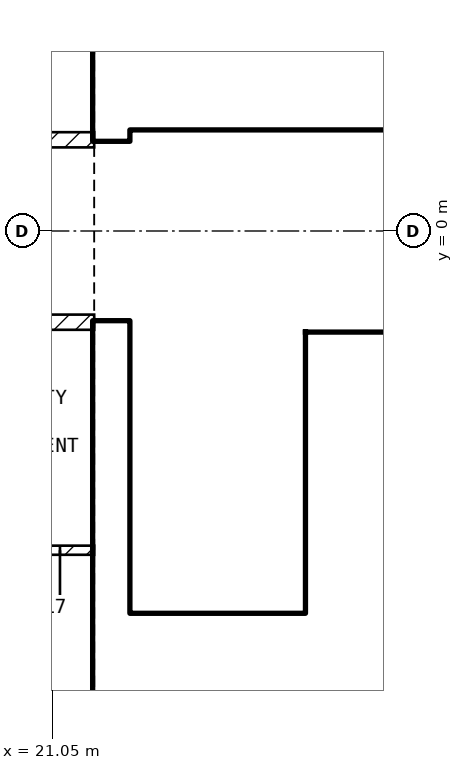
"""IFC4 building model, lengths in metres.
Left out: names, types, materials, properties, quantities, classifications, styles, units other than length and angle.
Written with IfcOpenShell. Run it as: python <this file> out.ifc"""

import sys

from ifc_helpers import new_model, si_unit, direction, frame, frame_2d, origin, place, context, subcontext, project, spatial, rectangle, extrude, element, fill, save


model = new_model("IFC4")
c1 = context("Model", 3, precision=1e-05, world=origin(), true_north=direction((0.0, 1.0)))
c2 = subcontext(c1, "Body", "Model", "MODEL_VIEW")
j1 = project(units=[si_unit("LENGTHUNIT", "METRE"), si_unit("PLANEANGLEUNIT", "RADIAN")], contexts=[c1])
p1 = place(None, origin())
s1 = spatial("IfcSite", under=j1, at=p1, CompositionType="ELEMENT")
p2 = place(p1, origin())
s2 = spatial("IfcBuilding", under=s1, at=p2, CompositionType="ELEMENT")
p3 = place(p2, frame((0.0, 0.0, 85.5)))
s3 = spatial("IfcBuildingStorey", under=s2, at=p3, CompositionType="ELEMENT", Elevation=85.5)
for number, where, z_axis, x_axis in (
    (1, (21.825, -8.1, 0.0), (0.0, 0.0, 1.0), (0.0, 1.0, 0.0)),
    (2, (21.825, 1.2, 0.0), (0.0, 0.0, 1.0), (0.0, 1.0, 0.0)),
):
    element("IfcWall", number, at=place(p3, frame(where, z_axis=z_axis, x_axis=x_axis)), inside=s3, PredefinedType="SHEAR", context=c2, shape_type="SweptSolid", body=[
        extrude(rectangle(XDim=6.9, YDim=0.45, at=frame_2d((3.45, 0.0))), origin(), (0.0, 0.0, 1.0), 3.25),
    ])
p4 = place(p3, frame((22.05, 1.45, 0.0), z_axis=(0.0, 0.0, 1.0), x_axis=(1.0, 0.0, 0.0)))
e3 = element("IfcWall", 3, at=p4, inside=s3, PredefinedType="SOLIDWALL", context=c2, shape_type="SweptSolid", body=[
    extrude(rectangle(XDim=13.05, YDim=0.2, at=frame_2d((6.525, 0.0))), origin(), (0.0, 0.0, 1.0), 3.25),
])
p5 = place(p4, frame((0.75, 0.0, 0.0)))
e4 = element("IfcOpeningElement", 4, at=p5, cuts=e3, PredefinedType="OPENING", context=c2, shape_type="SweptSolid", body=[
    extrude(rectangle(XDim=1.0, YDim=2.1, at=frame_2d((0.5, 1.05))), frame((0.0, 0.11, 0.0), z_axis=(0.0, -1.0, 0.0), x_axis=(1.0, 0.0, 0.0)), (0.0, 0.0, 1.0), 0.22),
])
p6 = place(p4, frame((3.25, 0.0, 0.0)))
e5 = element("IfcOpeningElement", 5, at=p6, cuts=e3, PredefinedType="OPENING", context=c2, shape_type="SweptSolid", body=[
    extrude(rectangle(XDim=1.0, YDim=2.1, at=frame_2d((0.5, 1.05))), frame((0.0, 0.11, 0.0), z_axis=(0.0, -1.0, 0.0), x_axis=(1.0, 0.0, 0.0)), (0.0, 0.0, 1.0), 0.22),
])
p7 = place(p3, frame((24.5, -5.05, 0.0), z_axis=(0.0, 0.0, 1.0), x_axis=(0.0, 1.0, 0.0)))
e6 = element("IfcWall", 6, at=p7, inside=s3, PredefinedType="SOLIDWALL", context=c2, shape_type="SweptSolid", body=[
    extrude(rectangle(XDim=3.7, YDim=0.2, at=frame_2d((1.85, 0.0))), origin(), (0.0, 0.0, 1.0), 3.25),
])
p8 = place(p7, frame((0.1, 0.0, 0.0)))
e7 = element("IfcOpeningElement", 7, at=p8, cuts=e6, PredefinedType="OPENING", context=c2, shape_type="SweptSolid", body=[
    extrude(rectangle(XDim=0.8, YDim=2.1, at=frame_2d((0.4, 1.05))), frame((0.0, 0.11, 0.0), z_axis=(0.0, -1.0, 0.0), x_axis=(1.0, 0.0, 0.0)), (0.0, 0.0, 1.0), 0.22),
])
p9 = place(p3, frame((22.05, -5.15, 0.0), z_axis=(0.0, 0.0, 1.0), x_axis=(1.0, 0.0, 0.0)))
e8 = element("IfcWall", 8, at=p9, inside=s3, PredefinedType="SOLIDWALL", context=c2, shape_type="SweptSolid", body=[
    extrude(rectangle(XDim=6.3, YDim=0.2, at=frame_2d((3.15, 0.0))), origin(), (0.0, 0.0, 1.0), 3.25),
])
p10 = place(p9, frame((0.2, 0.0, 0.0)))
e9 = element("IfcOpeningElement", 9, at=p10, cuts=e8, PredefinedType="OPENING", context=c2, shape_type="SweptSolid", body=[
    extrude(rectangle(XDim=1.0, YDim=2.1, at=frame_2d((0.5, 1.05))), frame((0.0, 0.11, 0.0), z_axis=(0.0, -1.0, 0.0), x_axis=(1.0, 0.0, 0.0)), (0.0, 0.0, 1.0), 0.22),
])
p11 = place(p3, frame((24.6, -1.45, 0.0), z_axis=(0.0, 0.0, 1.0), x_axis=(1.0, 0.0, 0.0)))
e10 = element("IfcWall", 10, at=p11, inside=s3, PredefinedType="SOLIDWALL", context=c2, shape_type="SweptSolid", body=[
    extrude(rectangle(XDim=10.5, YDim=0.2, at=frame_2d((5.25, 0.0))), origin(), (0.0, 0.0, 1.0), 3.25),
])
p12 = place(p11, frame((6.2, 0.0, 0.0)))
e11 = element("IfcOpeningElement", 11, at=p12, cuts=e10, PredefinedType="OPENING", context=c2, shape_type="SweptSolid", body=[
    extrude(rectangle(XDim=1.0, YDim=2.1, at=frame_2d((0.5, 1.05))), frame((0.0, 0.11, 0.0), z_axis=(0.0, -1.0, 0.0), x_axis=(1.0, 0.0, 0.0)), (0.0, 0.0, 1.0), 0.22),
])
p13 = place(p11, frame((7.75, 0.0, 0.0)))
e12 = element("IfcOpeningElement", 12, at=p13, cuts=e10, PredefinedType="OPENING", context=c2, shape_type="SweptSolid", body=[
    extrude(rectangle(XDim=1.0, YDim=2.1, at=frame_2d((0.5, 1.05))), frame((0.0, 0.11, 0.0), z_axis=(0.0, -1.0, 0.0), x_axis=(1.0, 0.0, 0.0)), (0.0, 0.0, 1.0), 0.22),
])
p14 = place(p11, frame((9.3, 0.0, 0.0)))
e13 = element("IfcOpeningElement", 13, at=p14, cuts=e10, PredefinedType="OPENING", context=c2, shape_type="SweptSolid", body=[
    extrude(rectangle(XDim=1.0, YDim=2.1, at=frame_2d((0.5, 1.05))), frame((0.0, 0.11, 0.0), z_axis=(0.0, -1.0, 0.0), x_axis=(1.0, 0.0, 0.0)), (0.0, 0.0, 1.0), 0.22),
])
p15 = place(p11, frame((0.45, 0.0, 0.0)))
e14 = element("IfcOpeningElement", 14, at=p15, cuts=e10, PredefinedType="OPENING", context=c2, shape_type="SweptSolid", body=[
    extrude(rectangle(XDim=0.9, YDim=2.1, at=frame_2d((0.45, 1.05))), frame((0.0, 0.11, 0.0), z_axis=(0.0, -1.0, 0.0), x_axis=(1.0, 0.0, 0.0)), (0.0, 0.0, 1.0), 0.22),
])
p16 = place(p11, frame((2.45, 0.0, 0.0)))
e15 = element("IfcOpeningElement", 15, at=p16, cuts=e10, PredefinedType="OPENING", context=c2, shape_type="SweptSolid", body=[
    extrude(rectangle(XDim=0.9, YDim=2.1, at=frame_2d((0.45, 1.05))), frame((0.0, 0.11, 0.0), z_axis=(0.0, -1.0, 0.0), x_axis=(1.0, 0.0, 0.0)), (0.0, 0.0, 1.0), 0.22),
])
p17 = place(p11, frame((4.45, 0.0, 0.0)))
e16 = element("IfcOpeningElement", 16, at=p17, cuts=e10, PredefinedType="OPENING", context=c2, shape_type="SweptSolid", body=[
    extrude(rectangle(XDim=0.9, YDim=2.1, at=frame_2d((0.45, 1.05))), frame((0.0, 0.11, 0.0), z_axis=(0.0, -1.0, 0.0), x_axis=(1.0, 0.0, 0.0)), (0.0, 0.0, 1.0), 0.22),
])
p18 = place(p3, frame((24.6, -3.95, 0.0), z_axis=(0.0, 0.0, 1.0), x_axis=(1.0, 0.0, 0.0)))
e17 = element("IfcWall", 17, at=p18, inside=s3, PredefinedType="SOLIDWALL", context=c2, shape_type="SweptSolid", body=[
    extrude(rectangle(XDim=10.5, YDim=0.2, at=frame_2d((5.25, 0.0))), origin(), (0.0, 0.0, 1.0), 3.25),
])
p19 = place(p3, frame((1.1, 1.2, 0.0), z_axis=(0.0, 0.0, 1.0), x_axis=(1.0, 0.0, 0.0)))
e18 = element("IfcWall", 18, at=p19, inside=s3, PredefinedType="PARTITIONING", context=c2, shape_type="SweptSolid", body=[
    extrude(rectangle(XDim=20.5, YDim=0.2, at=frame_2d((10.25, 0.0))), origin(), (0.0, 0.0, 1.0), 3.25),
])
p20 = place(p19, frame((15.2, 0.0, 0.0)))
e19 = element("IfcOpeningElement", 19, at=p20, cuts=e18, PredefinedType="OPENING", context=c2, shape_type="SweptSolid", body=[
    extrude(rectangle(XDim=1.0, YDim=2.1, at=frame_2d((0.5, 1.05))), frame((0.0, 0.11, 0.0), z_axis=(0.0, -1.0, 0.0), x_axis=(1.0, 0.0, 0.0)), (0.0, 0.0, 1.0), 0.22),
])
p21 = place(p3, frame((21.6, -1.2, 0.0), z_axis=(0.0, 0.0, 1.0), x_axis=(-1.0, 0.0, 0.0)))
e20 = element("IfcWall", 20, at=p21, inside=s3, PredefinedType="PARTITIONING", context=c2, shape_type="SweptSolid", body=[
    extrude(rectangle(XDim=20.5, YDim=0.2, at=frame_2d((10.25, 0.0))), origin(), (0.0, 0.0, 1.0), 3.25),
])
p22 = place(p21, frame((10.375, 0.0, 0.0)))
e21 = element("IfcOpeningElement", 21, at=p22, cuts=e20, PredefinedType="OPENING", context=c2, shape_type="SweptSolid", body=[
    extrude(rectangle(XDim=1.0, YDim=2.1, at=frame_2d((0.5, 1.05))), frame((0.0, 0.11, 0.0), z_axis=(0.0, -1.0, 0.0), x_axis=(1.0, 0.0, 0.0)), (0.0, 0.0, 1.0), 0.22),
])
p23 = place(p3, frame((21.6, -4.2, 0.0), z_axis=(0.0, 0.0, 1.0), x_axis=(-1.0, 0.0, 0.0)))
e22 = element("IfcWall", 22, at=p23, inside=s3, PredefinedType="PARTITIONING", context=c2, shape_type="SweptSolid", body=[
    extrude(rectangle(XDim=1.8, YDim=0.12, at=frame_2d((0.9, 0.0))), origin(), (0.0, 0.0, 1.0), 3.25),
])
p24 = place(p23, frame((0.45, 0.0, 0.0)))
e23 = element("IfcOpeningElement", 23, at=p24, cuts=e22, PredefinedType="OPENING", context=c2, shape_type="SweptSolid", body=[
    extrude(rectangle(XDim=0.9, YDim=2.1, at=frame_2d((0.45, 1.05))), frame((0.0, 0.07, 0.0), z_axis=(0.0, -1.0, 0.0), x_axis=(1.0, 0.0, 0.0)), (0.0, 0.0, 1.0), 0.14),
])
p25 = place(p10, origin())
e24 = element("IfcDoor", 24, at=p25, inside=s3, OperationType="SINGLE_SWING_LEFT", PredefinedType="DOOR", context=c2, shape_type="SweptSolid", body=[
    extrude(rectangle(XDim=1.0, YDim=2.1, at=frame_2d((0.5, 1.05))), frame((0.0, 0.025, 0.0), z_axis=(0.0, -1.0, 0.0), x_axis=(1.0, 0.0, 0.0)), (0.0, 0.0, 1.0), 0.05),
])
fill(e9, e24)
p26 = place(p5, origin())
e25 = element("IfcDoor", 25, at=p26, inside=s3, OperationType="SINGLE_SWING_LEFT", PredefinedType="DOOR", context=c2, shape_type="SweptSolid", body=[
    extrude(rectangle(XDim=1.0, YDim=2.1, at=frame_2d((0.5, 1.05))), frame((0.0, 0.025, 0.0), z_axis=(0.0, -1.0, 0.0), x_axis=(1.0, 0.0, 0.0)), (0.0, 0.0, 1.0), 0.05),
])
fill(e4, e25)
p27 = place(p8, origin())
e26 = element("IfcDoor", 26, at=p27, inside=s3, OperationType="SINGLE_SWING_LEFT", PredefinedType="DOOR", context=c2, shape_type="SweptSolid", body=[
    extrude(rectangle(XDim=0.8, YDim=2.1, at=frame_2d((0.4, 1.05))), frame((0.0, 0.025, 0.0), z_axis=(0.0, -1.0, 0.0), x_axis=(1.0, 0.0, 0.0)), (0.0, 0.0, 1.0), 0.05),
])
fill(e7, e26)
p28 = place(p15, origin())
e27 = element("IfcDoor", 27, at=p28, inside=s3, OperationType="SINGLE_SWING_LEFT", PredefinedType="DOOR", context=c2, shape_type="SweptSolid", body=[
    extrude(rectangle(XDim=0.9, YDim=2.1, at=frame_2d((0.45, 1.05))), frame((0.0, 0.025, 0.0), z_axis=(0.0, -1.0, 0.0), x_axis=(1.0, 0.0, 0.0)), (0.0, 0.0, 1.0), 0.05),
])
fill(e14, e27)
p29 = place(p6, origin())
e28 = element("IfcDoor", 28, at=p29, inside=s3, OperationType="SINGLE_SWING_LEFT", PredefinedType="DOOR", context=c2, shape_type="SweptSolid", body=[
    extrude(rectangle(XDim=1.0, YDim=2.1, at=frame_2d((0.5, 1.05))), frame((0.0, 0.025, 0.0), z_axis=(0.0, -1.0, 0.0), x_axis=(1.0, 0.0, 0.0)), (0.0, 0.0, 1.0), 0.05),
])
fill(e5, e28)
p30 = place(p24, origin())
e29 = element("IfcDoor", 29, at=p30, inside=s3, OperationType="SINGLE_SWING_LEFT", PredefinedType="DOOR", context=c2, shape_type="SweptSolid", body=[
    extrude(rectangle(XDim=0.9, YDim=2.1, at=frame_2d((0.45, 1.05))), frame((0.0, 0.025, 0.0), z_axis=(0.0, -1.0, 0.0), x_axis=(1.0, 0.0, 0.0)), (0.0, 0.0, 1.0), 0.05),
])
fill(e23, e29)
save(model, sys.argv[1])
